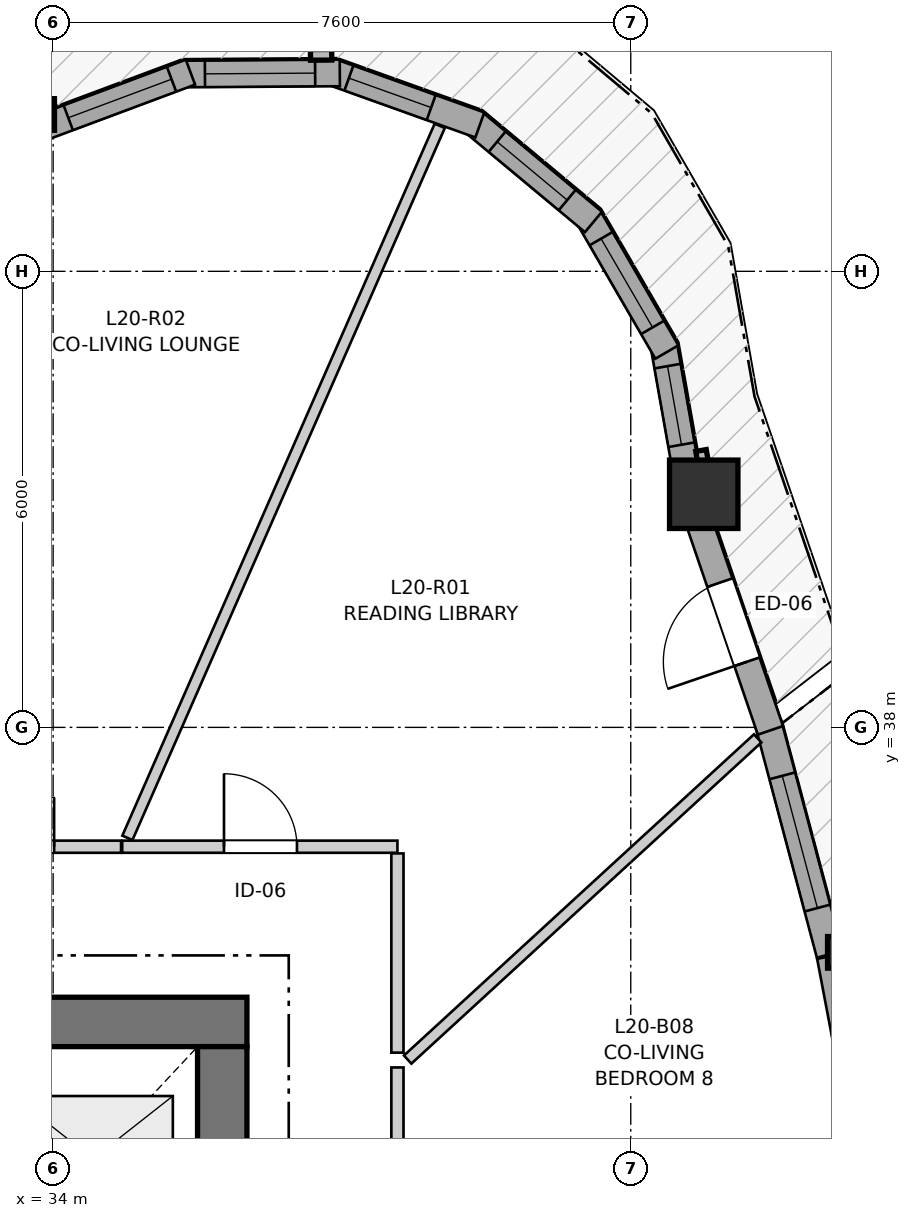
"""IFC4 building model, lengths in metres.
Left out: names, types, materials, properties, quantities, classifications, styles, units other than length and angle.
Written with IfcOpenShell. Run it as: python <this file> out.ifc"""

import sys

from ifc_helpers import new_model, si_unit, direction, frame, frame_2d, origin, origin_2d, place, context, subcontext, project, spatial, rectangle, i_section, extrude, source, transform, mapped, element, fill, save


model = new_model("IFC4")
c1 = context("Model", 3, precision=1e-05, world=origin(), true_north=direction((0.0, 1.0)))
c2 = subcontext(c1, "Body", "Model", "MODEL_VIEW")
j1 = project(units=[si_unit("LENGTHUNIT", "METRE"), si_unit("PLANEANGLEUNIT", "RADIAN")], contexts=[c1])
p1 = place(None, origin())
s1 = spatial("IfcSite", under=j1, at=p1, CompositionType="ELEMENT")
p2 = place(p1, origin())
s2 = spatial("IfcBuilding", under=s1, at=p2, CompositionType="ELEMENT")
p3 = place(p2, frame((0.0, 0.0, 70.4)))
s3 = spatial("IfcBuildingStorey", under=s2, at=p3, CompositionType="ELEMENT", Elevation=70.4)
p4 = place(p3, frame((36.55, 34.125, 0.0), z_axis=(0.0, 0.0, 1.0), x_axis=(-1.0, 0.0, 0.0)))
e1 = element("IfcWall", 1, at=p4, inside=s3, PredefinedType="SHEAR", context=c2, shape_type="SweptSolid", body=[
    extrude(rectangle(XDim=12.4, YDim=0.65, at=frame_2d((6.2, 0.0))), origin(), (0.0, 0.0, 1.0), 2.95),
])
p5 = place(p3, frame((36.225, 18.2, 0.0), z_axis=(0.0, 0.0, 1.0), x_axis=(0.0, 1.0, 0.0)))
e2 = element("IfcWall", 2, at=p5, inside=s3, PredefinedType="SHEAR", context=c2, shape_type="SweptSolid", body=[
    extrude(rectangle(XDim=15.6, YDim=0.65, at=frame_2d((7.8, 0.0))), origin(), (0.0, 0.0, 1.0), 2.95),
])
p6 = place(p5, frame((4.25, 0.0, 0.0)))
e3 = element("IfcOpeningElement", 3, at=p6, cuts=e2, PredefinedType="OPENING", context=c2, shape_type="SweptSolid", body=[
    extrude(rectangle(XDim=1.1, YDim=2.15, at=frame_2d((0.55, 1.075))), frame((0.0, 0.335, 0.0), z_axis=(0.0, -1.0, 0.0), x_axis=(1.0, 0.0, 0.0)), (0.0, 0.0, 1.0), 0.67),
])
p7 = place(p5, frame((10.25, 0.0, 0.0)))
e4 = element("IfcOpeningElement", 4, at=p7, cuts=e2, PredefinedType="OPENING", context=c2, shape_type="SweptSolid", body=[
    extrude(rectangle(XDim=1.1, YDim=2.15, at=frame_2d((0.55, 1.075))), frame((0.0, 0.335, 0.0), z_axis=(0.0, -1.0, 0.0), x_axis=(1.0, 0.0, 0.0)), (0.0, 0.0, 1.0), 0.67),
])
m1 = source(origin(), c2, "Body", "SweptSolid", [
    extrude(i_section(OverallWidth=0.406, OverallDepth=0.416, WebThickness=0.027, FlangeThickness=0.044, FilletRadius=0.015, at=origin_2d()), origin(), (0.0, 0.0, 1.0), 2.95),
])
p8 = place(p3, frame((44.392, 35.04, 0.0), z_axis=(0.0, 0.0, 1.0), x_axis=(1.0, 0.0, 0.0)))
e5 = element("IfcColumn", 5, at=p8, inside=s3, PredefinedType="PILASTER", context=c2, shape_type="MappedRepresentation", body=[
    mapped(m1, transform((0.0, 0.0, 0.0), x_axis=(1.0, 0.0, 0.0), y_axis=(0.0, 1.0, 0.0), z_axis=(0.0, 0.0, 1.0), scale=1.0)),
])
m2 = source(origin(), c2, "Body", "SweptSolid", [
    extrude(rectangle(XDim=0.9, YDim=0.9, at=origin_2d()), origin(), (0.0, 0.0, 1.0), 2.95),
])
p9 = place(p3, frame((42.56, 41.067, 0.0), z_axis=(0.0, 0.0, 1.0), x_axis=(1.0, 0.0, 0.0)))
e6 = element("IfcColumn", 6, at=p9, inside=s3, PredefinedType="COLUMN", context=c2, shape_type="MappedRepresentation", body=[
    mapped(m2, transform((0.0, 0.0, 0.0), x_axis=(1.0, 0.0, 0.0), y_axis=(0.0, 1.0, 0.0), z_axis=(0.0, 0.0, 1.0), scale=1.0)),
])
p10 = place(p3, frame((33.815, 46.063, 0.0), z_axis=(0.0, 0.0, 1.0), x_axis=(1.0, 0.0, 0.0)))
e7 = element("IfcColumn", 7, at=p10, inside=s3, PredefinedType="PILASTER", context=c2, shape_type="MappedRepresentation", body=[
    mapped(m1, transform((0.0, 0.0, 0.0), x_axis=(1.0, 0.0, 0.0), y_axis=(0.0, 1.0, 0.0), z_axis=(0.0, 0.0, 1.0), scale=1.0)),
])
p11 = place(p3, frame((44.8, 31.957, 0.0), z_axis=(0.0, 0.0, 1.0), x_axis=(-0.186672102023, 0.982422274954, 0.0)))
e8 = element("IfcWall", 8, at=p11, inside=s3, PredefinedType="SOLIDWALL", context=c2, shape_type="SweptSolid", body=[
    extrude(rectangle(XDim=3.085, YDim=0.35, at=frame_2d((1.542, 0.0))), origin(), (0.0, 0.0, 1.0), 2.48),
])
p12 = place(p11, frame((0.978, 0.0, 0.82)))
e9 = element("IfcOpeningElement", 9, at=p12, cuts=e8, PredefinedType="OPENING", context=c2, shape_type="SweptSolid", body=[
    extrude(rectangle(XDim=1.15, YDim=1.2, at=frame_2d((0.575, 0.6))), frame((0.0, 0.185, 0.0), z_axis=(0.0, -1.0, 0.0), x_axis=(1.0, 0.0, 0.0)), (0.0, 0.0, 1.0), 0.37),
])
p13 = place(p3, frame((44.218, 35.014, 0.0), z_axis=(0.0, 0.0, 1.0), x_axis=(-0.25705209467, 0.96639754792, 0.0)))
e10 = element("IfcWall", 10, at=p13, inside=s3, PredefinedType="SOLIDWALL", context=c2, shape_type="SweptSolid", body=[
    extrude(rectangle(XDim=3.136, YDim=0.35, at=frame_2d((1.568, 0.0))), origin(), (0.0, 0.0, 1.0), 2.48),
])
p14 = place(p13, frame((0.63, 0.0, 0.82)))
e11 = element("IfcOpeningElement", 11, at=p14, cuts=e10, PredefinedType="OPENING", context=c2, shape_type="SweptSolid", body=[
    extrude(rectangle(XDim=1.8, YDim=1.45, at=frame_2d((0.9, 0.725))), frame((0.0, 0.185, 0.0), z_axis=(0.0, -1.0, 0.0), x_axis=(1.0, 0.0, 0.0)), (0.0, 0.0, 1.0), 0.37),
])
p15 = place(p3, frame((43.437, 37.961, 0.0), z_axis=(0.0, 0.0, 1.0), x_axis=(-0.323572555921, 0.946203361363, 0.0)))
e12 = element("IfcWall", 12, at=p15, inside=s3, PredefinedType="SOLIDWALL", context=c2, shape_type="SweptSolid", body=[
    extrude(rectangle(XDim=2.998, YDim=0.35, at=frame_2d((1.499, 0.0))), origin(), (0.0, 0.0, 1.0), 2.48),
])
p16 = place(p15, frame((0.954, 0.0, 0.0)))
e13 = element("IfcOpeningElement", 13, at=p16, cuts=e12, PredefinedType="OPENING", context=c2, shape_type="SweptSolid", body=[
    extrude(rectangle(XDim=1.1, YDim=2.1, at=frame_2d((0.55, 1.05))), frame((0.0, 0.185, 0.0), z_axis=(0.0, -1.0, 0.0), x_axis=(1.0, 0.0, 0.0)), (0.0, 0.0, 1.0), 0.37),
])
p17 = place(p3, frame((42.348, 41.258, 0.0), z_axis=(0.0, 0.0, 1.0), x_axis=(-0.174331490339, 0.984687022092, 0.0)))
e14 = element("IfcWall", 14, at=p17, inside=s3, PredefinedType="SOLIDWALL", context=c2, shape_type="SweptSolid", body=[
    extrude(rectangle(XDim=1.836, YDim=0.35, at=frame_2d((0.918, 0.0))), origin(), (0.0, 0.0, 1.0), 2.48),
])
p18 = place(p17, frame((0.468, 0.0, 0.82)))
e15 = element("IfcOpeningElement", 15, at=p18, cuts=e14, PredefinedType="OPENING", context=c2, shape_type="SweptSolid", body=[
    extrude(rectangle(XDim=1.05, YDim=1.45, at=frame_2d((0.525, 0.725))), frame((0.0, 0.185, 0.0), z_axis=(0.0, -1.0, 0.0), x_axis=(1.0, 0.0, 0.0)), (0.0, 0.0, 1.0), 0.37),
])
p19 = place(p3, frame((42.075, 42.938, 0.0), z_axis=(0.0, 0.0, 1.0), x_axis=(-0.501902596059, 0.864924149315, 0.0)))
e16 = element("IfcWall", 16, at=p19, inside=s3, PredefinedType="SOLIDWALL", context=c2, shape_type="SweptSolid", body=[
    extrude(rectangle(XDim=2.099, YDim=0.35, at=frame_2d((1.049, 0.0))), origin(), (0.0, 0.0, 1.0), 2.48),
])
p20 = place(p19, frame((0.375, 0.0, 0.82)))
e17 = element("IfcOpeningElement", 17, at=p20, cuts=e16, PredefinedType="OPENING", context=c2, shape_type="SweptSolid", body=[
    extrude(rectangle(XDim=1.35, YDim=1.45, at=frame_2d((0.675, 0.725))), frame((0.0, 0.185, 0.0), z_axis=(0.0, -1.0, 0.0), x_axis=(1.0, 0.0, 0.0)), (0.0, 0.0, 1.0), 0.37),
])
p21 = place(p3, frame((41.109, 44.65, 0.0), z_axis=(0.0, 0.0, 1.0), x_axis=(-0.768450068703, 0.639909752942, 0.0)))
e18 = element("IfcWall", 18, at=p21, inside=s3, PredefinedType="SOLIDWALL", context=c2, shape_type="SweptSolid", body=[
    extrude(rectangle(XDim=2.099, YDim=0.35, at=frame_2d((1.049, 0.0))), origin(), (0.0, 0.0, 1.0), 2.48),
])
p22 = place(p21, frame((0.449, 0.0, 0.82)))
e19 = element("IfcOpeningElement", 19, at=p22, cuts=e18, PredefinedType="OPENING", context=c2, shape_type="SweptSolid", body=[
    extrude(rectangle(XDim=1.2, YDim=1.45, at=frame_2d((0.6, 0.725))), frame((0.0, 0.185, 0.0), z_axis=(0.0, -1.0, 0.0), x_axis=(1.0, 0.0, 0.0)), (0.0, 0.0, 1.0), 0.37),
])
p23 = place(p3, frame((39.614, 45.925, 0.0), z_axis=(0.0, 0.0, 1.0), x_axis=(-0.941486401639, 0.33705096874, 0.0)))
e20 = element("IfcWall", 20, at=p23, inside=s3, PredefinedType="SOLIDWALL", context=c2, shape_type="SweptSolid", body=[
    extrude(rectangle(XDim=2.099, YDim=0.35, at=frame_2d((1.05, 0.0))), origin(), (0.0, 0.0, 1.0), 2.48),
])
p24 = place(p23, frame((0.68, 0.0, 0.82)))
e21 = element("IfcOpeningElement", 21, at=p24, cuts=e20, PredefinedType="OPENING", context=c2, shape_type="SweptSolid", body=[
    extrude(rectangle(XDim=1.15, YDim=1.2, at=frame_2d((0.575, 0.6))), frame((0.0, 0.185, 0.0), z_axis=(0.0, -1.0, 0.0), x_axis=(1.0, 0.0, 0.0)), (0.0, 0.0, 1.0), 0.37),
])
p25 = place(p3, frame((37.772, 46.61, 0.0), z_axis=(0.0, 0.0, 1.0), x_axis=(-0.999976451414, -0.006862697526, 0.0)))
e22 = element("IfcWall", 22, at=p25, inside=s3, PredefinedType="SOLIDWALL", context=c2, shape_type="SweptSolid", body=[
    extrude(rectangle(XDim=2.099, YDim=0.35, at=frame_2d((1.049, 0.0))), origin(), (0.0, 0.0, 1.0), 2.48),
])
p26 = place(p25, frame((0.324, 0.0, 0.82)))
e23 = element("IfcOpeningElement", 23, at=p26, cuts=e22, PredefinedType="OPENING", context=c2, shape_type="SweptSolid", body=[
    extrude(rectangle(XDim=1.45, YDim=1.25, at=frame_2d((0.725, 0.625))), frame((0.0, 0.185, 0.0), z_axis=(0.0, -1.0, 0.0), x_axis=(1.0, 0.0, 0.0)), (0.0, 0.0, 1.0), 0.37),
])
p27 = place(p3, frame((35.806, 46.62, 0.0), z_axis=(0.0, 0.0, 1.0), x_axis=(-0.936863987578, -0.34969396446, 0.0)))
e24 = element("IfcWall", 24, at=p27, inside=s3, PredefinedType="SOLIDWALL", context=c2, shape_type="SweptSolid", body=[
    extrude(rectangle(XDim=2.041, YDim=0.35, at=frame_2d((1.021, 0.0))), origin(), (0.0, 0.0, 1.0), 2.48),
])
p28 = place(p27, frame((0.265, 0.0, 0.82)))
e25 = element("IfcOpeningElement", 25, at=p28, cuts=e24, PredefinedType="OPENING", context=c2, shape_type="SweptSolid", body=[
    extrude(rectangle(XDim=1.45, YDim=1.25, at=frame_2d((0.725, 0.625))), frame((0.0, 0.185, 0.0), z_axis=(0.0, -1.0, 0.0), x_axis=(1.0, 0.0, 0.0)), (0.0, 0.0, 1.0), 0.37),
])
p29 = place(p3, frame((38.53, 33.526, 0.0), z_axis=(0.0, 0.0, 1.0), x_axis=(0.0, -1.0, 0.0)))
e26 = element("IfcWall", 26, at=p29, inside=s3, PredefinedType="PARTITIONING", context=c2, shape_type="SweptSolid", body=[
    extrude(rectangle(XDim=5.472, YDim=0.16, at=frame_2d((2.736, 0.0))), origin(), (0.0, 0.0, 1.0), 2.95),
])
p30 = place(p29, frame((2.278, 0.0, 0.0)))
e27 = element("IfcOpeningElement", 27, at=p30, cuts=e26, PredefinedType="OPENING", context=c2, shape_type="SweptSolid", body=[
    extrude(rectangle(XDim=0.92, YDim=2.1, at=frame_2d((0.46, 1.05))), frame((0.0, 0.09, 0.0), z_axis=(0.0, -1.0, 0.0), x_axis=(1.0, 0.0, 0.0)), (0.0, 0.0, 1.0), 0.18),
])
p31 = place(p3, frame((34.909, 36.43, 0.0), z_axis=(0.0, 0.0, 1.0), x_axis=(1.0, 0.0, 0.0)))
e28 = element("IfcWall", 28, at=p31, inside=s3, PredefinedType="PARTITIONING", context=c2, shape_type="SweptSolid", body=[
    extrude(rectangle(XDim=3.621, YDim=0.16, at=frame_2d((1.811, 0.0))), origin(), (0.0, 0.0, 1.0), 2.588),
])
p32 = place(p31, frame((1.339, 0.0, 0.0)))
e29 = element("IfcOpeningElement", 29, at=p32, cuts=e28, PredefinedType="OPENING", context=c2, shape_type="SweptSolid", body=[
    extrude(rectangle(XDim=0.96, YDim=2.1, at=frame_2d((0.48, 1.05))), frame((0.0, 0.09, 0.0), z_axis=(0.0, -1.0, 0.0), x_axis=(1.0, 0.0, 0.0)), (0.0, 0.0, 1.0), 0.18),
])
p33 = place(p3, frame((31.785, 36.43, 0.0), z_axis=(0.0, 0.0, 1.0), x_axis=(1.0, 0.0, 0.0)))
e30 = element("IfcWall", 30, at=p33, inside=s3, PredefinedType="PARTITIONING", context=c2, shape_type="SweptSolid", body=[
    extrude(rectangle(XDim=3.109, YDim=0.16, at=frame_2d((1.555, 0.0))), origin(), (0.0, 0.0, 1.0), 2.95),
])
p34 = place(p33, frame((0.928, 0.0, 0.0)))
e31 = element("IfcOpeningElement", 31, at=p34, cuts=e30, PredefinedType="OPENING", context=c2, shape_type="SweptSolid", body=[
    extrude(rectangle(XDim=1.3, YDim=2.1, at=frame_2d((0.65, 1.05))), frame((0.0, 0.09, 0.0), z_axis=(0.0, -1.0, 0.0), x_axis=(1.0, 0.0, 0.0)), (0.0, 0.0, 1.0), 0.18),
])
p35 = place(p3, frame((34.977, 36.546, 0.0), z_axis=(0.0, 0.0, 1.0), x_axis=(0.40175384449, 0.915747699117, 0.0)))
e32 = element("IfcWall", 32, at=p35, inside=s3, PredefinedType="PARTITIONING", context=c2, shape_type="SweptSolid", body=[
    extrude(rectangle(XDim=10.23, YDim=0.145, at=frame_2d((5.115, 0.0))), origin(), (0.0, 0.0, 1.0), 2.95),
])
p36 = place(p3, frame((38.665, 33.63, 0.0), z_axis=(0.0, 0.0, 1.0), x_axis=(0.736824900837, 0.676083623161, 0.0)))
e33 = element("IfcWall", 33, at=p36, inside=s3, PredefinedType="PARTITIONING", context=c2, shape_type="SweptSolid", body=[
    extrude(rectangle(XDim=6.25, YDim=0.145, at=frame_2d((3.125, 0.0))), origin(), (0.0, 0.0, 1.0), 2.95),
])
p37 = place(p3, frame((38.53, 33.721, 0.0), z_axis=(0.0, 0.0, 1.0), x_axis=(0.0, 1.0, 0.0)))
e34 = element("IfcWall", 34, at=p37, inside=s3, PredefinedType="PARTITIONING", context=c2, shape_type="SweptSolid", body=[
    extrude(rectangle(XDim=2.621, YDim=0.16, at=frame_2d((1.311, 0.0))), origin(), (0.0, 0.0, 1.0), 2.588),
])
m3 = source(origin(), c2, "Body", "SweptSolid", [
    extrude(rectangle(XDim=1.8, YDim=1.45, at=frame_2d((0.9, 0.725))), frame((0.0, 0.03, 0.0), z_axis=(0.0, -1.0, 0.0), x_axis=(1.0, 0.0, 0.0)), (0.0, 0.0, 1.0), 0.06),
])
p38 = place(p14, origin())
e35 = element("IfcWindow", 35, at=p38, inside=s3, PartitioningType="SINGLE_PANEL", PredefinedType="WINDOW", context=c2, shape_type="MappedRepresentation", body=[
    mapped(m3, transform((0.0, 0.0, 0.0), x_axis=(1.0, 0.0, 0.0), y_axis=(0.0, 1.0, 0.0), z_axis=(0.0, 0.0, 1.0), scale=1.0)),
])
fill(e11, e35)
m4 = source(origin(), c2, "Body", "SweptSolid", [
    extrude(rectangle(XDim=1.1, YDim=2.1, at=frame_2d((0.55, 1.05))), frame((0.0, 0.025, 0.0), z_axis=(0.0, -1.0, 0.0), x_axis=(1.0, 0.0, 0.0)), (0.0, 0.0, 1.0), 0.05),
])
p39 = place(p16, origin())
e36 = element("IfcDoor", 36, at=p39, inside=s3, OperationType="SINGLE_SWING_LEFT", PredefinedType="DOOR", context=c2, shape_type="MappedRepresentation", body=[
    mapped(m4, transform((0.0, 0.0, 0.0), x_axis=(1.0, 0.0, 0.0), y_axis=(0.0, 1.0, 0.0), z_axis=(0.0, 0.0, 1.0), scale=1.0)),
])
fill(e13, e36)
m5 = source(origin(), c2, "Body", "SweptSolid", [
    extrude(rectangle(XDim=1.05, YDim=1.45, at=frame_2d((0.525, 0.725))), frame((0.0, 0.03, 0.0), z_axis=(0.0, -1.0, 0.0), x_axis=(1.0, 0.0, 0.0)), (0.0, 0.0, 1.0), 0.06),
])
p40 = place(p18, origin())
e37 = element("IfcWindow", 37, at=p40, inside=s3, PartitioningType="SINGLE_PANEL", PredefinedType="WINDOW", context=c2, shape_type="MappedRepresentation", body=[
    mapped(m5, transform((0.0, 0.0, 0.0), x_axis=(1.0, 0.0, 0.0), y_axis=(0.0, 1.0, 0.0), z_axis=(0.0, 0.0, 1.0), scale=1.0)),
])
fill(e15, e37)
m6 = source(origin(), c2, "Body", "SweptSolid", [
    extrude(rectangle(XDim=1.35, YDim=1.45, at=frame_2d((0.675, 0.725))), frame((0.0, 0.03, 0.0), z_axis=(0.0, -1.0, 0.0), x_axis=(1.0, 0.0, 0.0)), (0.0, 0.0, 1.0), 0.06),
])
p41 = place(p20, origin())
e38 = element("IfcWindow", 38, at=p41, inside=s3, PartitioningType="SINGLE_PANEL", PredefinedType="WINDOW", context=c2, shape_type="MappedRepresentation", body=[
    mapped(m6, transform((0.0, 0.0, 0.0), x_axis=(1.0, 0.0, 0.0), y_axis=(0.0, 1.0, 0.0), z_axis=(0.0, 0.0, 1.0), scale=1.0)),
])
fill(e17, e38)
m7 = source(origin(), c2, "Body", "SweptSolid", [
    extrude(rectangle(XDim=1.2, YDim=1.45, at=frame_2d((0.6, 0.725))), frame((0.0, 0.03, 0.0), z_axis=(0.0, -1.0, 0.0), x_axis=(1.0, 0.0, 0.0)), (0.0, 0.0, 1.0), 0.06),
])
p42 = place(p22, origin())
e39 = element("IfcWindow", 39, at=p42, inside=s3, PartitioningType="SINGLE_PANEL", PredefinedType="WINDOW", context=c2, shape_type="MappedRepresentation", body=[
    mapped(m7, transform((0.0, 0.0, 0.0), x_axis=(1.0, 0.0, 0.0), y_axis=(0.0, 1.0, 0.0), z_axis=(0.0, 0.0, 1.0), scale=1.0)),
])
fill(e19, e39)
m8 = source(origin(), c2, "Body", "SweptSolid", [
    extrude(rectangle(XDim=1.15, YDim=1.2, at=frame_2d((0.575, 0.6))), frame((0.0, 0.03, 0.0), z_axis=(0.0, -1.0, 0.0), x_axis=(1.0, 0.0, 0.0)), (0.0, 0.0, 1.0), 0.06),
])
p43 = place(p24, origin())
e40 = element("IfcWindow", 40, at=p43, inside=s3, PartitioningType="SINGLE_PANEL", PredefinedType="WINDOW", context=c2, shape_type="MappedRepresentation", body=[
    mapped(m8, transform((0.0, 0.0, 0.0), x_axis=(1.0, 0.0, 0.0), y_axis=(0.0, 1.0, 0.0), z_axis=(0.0, 0.0, 1.0), scale=1.0)),
])
fill(e21, e40)
m9 = source(origin(), c2, "Body", "SweptSolid", [
    extrude(rectangle(XDim=1.45, YDim=1.25, at=frame_2d((0.725, 0.625))), frame((0.0, 0.03, 0.0), z_axis=(0.0, -1.0, 0.0), x_axis=(1.0, 0.0, 0.0)), (0.0, 0.0, 1.0), 0.06),
])
p44 = place(p26, origin())
e41 = element("IfcWindow", 41, at=p44, inside=s3, PartitioningType="SINGLE_PANEL", PredefinedType="WINDOW", context=c2, shape_type="MappedRepresentation", body=[
    mapped(m9, transform((0.0, 0.0, 0.0), x_axis=(1.0, 0.0, 0.0), y_axis=(0.0, 1.0, 0.0), z_axis=(0.0, 0.0, 1.0), scale=1.0)),
])
fill(e23, e41)
p45 = place(p28, origin())
e42 = element("IfcWindow", 42, at=p45, inside=s3, PartitioningType="SINGLE_PANEL", PredefinedType="WINDOW", context=c2, shape_type="MappedRepresentation", body=[
    mapped(m9, transform((0.0, 0.0, 0.0), x_axis=(1.0, 0.0, 0.0), y_axis=(0.0, 1.0, 0.0), z_axis=(0.0, 0.0, 1.0), scale=1.0)),
])
fill(e25, e42)
m10 = source(origin(), c2, "Body", "SweptSolid", [
    extrude(rectangle(XDim=0.96, YDim=2.1, at=frame_2d((0.48, 1.05))), frame((0.0, 0.025, 0.0), z_axis=(0.0, -1.0, 0.0), x_axis=(1.0, 0.0, 0.0)), (0.0, 0.0, 1.0), 0.05),
])
p46 = place(p32, origin())
e43 = element("IfcDoor", 43, at=p46, inside=s3, OperationType="SINGLE_SWING_LEFT", PredefinedType="DOOR", context=c2, shape_type="MappedRepresentation", body=[
    mapped(m10, transform((0.0, 0.0, 0.0), x_axis=(1.0, 0.0, 0.0), y_axis=(0.0, 1.0, 0.0), z_axis=(0.0, 0.0, 1.0), scale=1.0)),
])
fill(e29, e43)
m11 = source(origin(), c2, "Body", "SweptSolid", [
    extrude(rectangle(XDim=1.3, YDim=2.1, at=frame_2d((0.65, 1.05))), frame((0.0, 0.025, 0.0), z_axis=(0.0, -1.0, 0.0), x_axis=(1.0, 0.0, 0.0)), (0.0, 0.0, 1.0), 0.05),
])
p47 = place(p34, origin())
e44 = element("IfcDoor", 44, at=p47, inside=s3, OperationType="DOUBLE_DOOR_SINGLE_SWING", PredefinedType="DOOR", context=c2, shape_type="MappedRepresentation", body=[
    mapped(m11, transform((0.0, 0.0, 0.0), x_axis=(1.0, 0.0, 0.0), y_axis=(0.0, 1.0, 0.0), z_axis=(0.0, 0.0, 1.0), scale=1.0)),
])
fill(e31, e44)
save(model, sys.argv[1])
